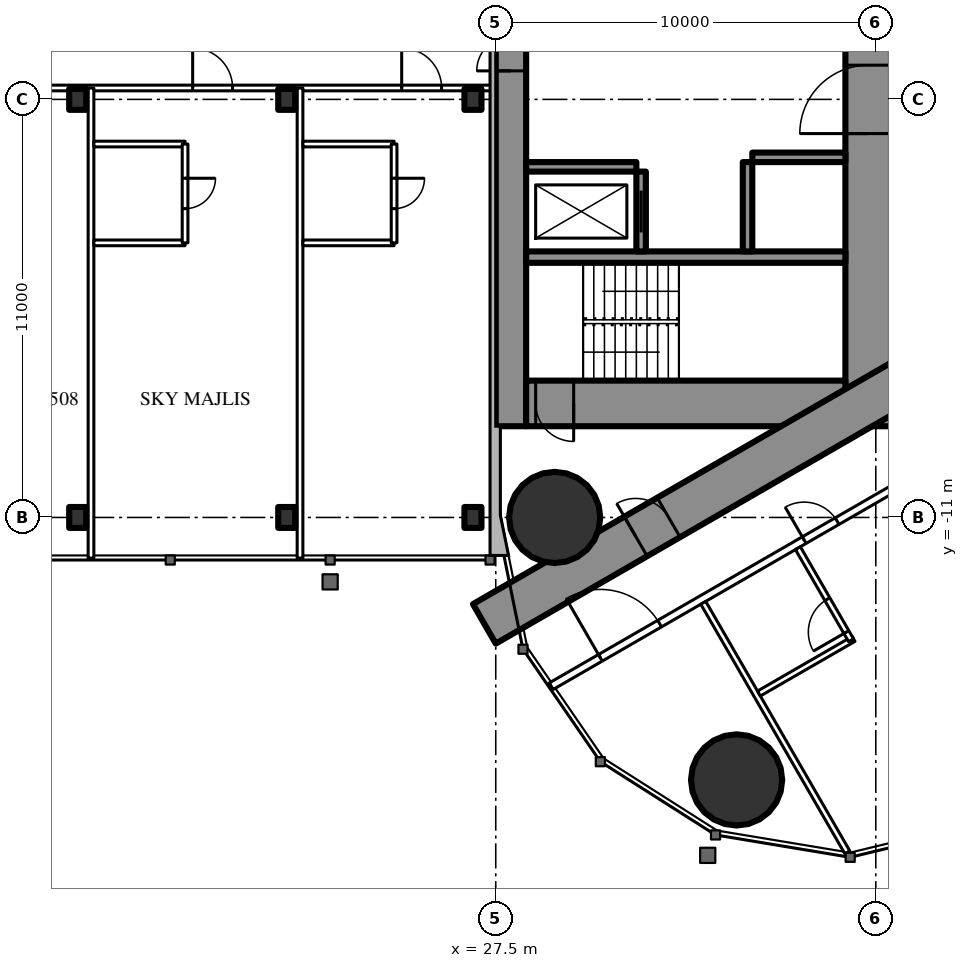
"""IFC4 building model, lengths in metres.
Left out: names, types, materials, properties, quantities, classifications, styles, units other than length and angle.
Written with IfcOpenShell. Run it as: python <this file> out.ifc"""

import sys

from ifc_helpers import new_model, si_unit, direction, frame, frame_2d, origin, origin_2d, place, context, subcontext, project, spatial, rectangle, circle, i_section, extrude, element, fill, save


model = new_model("IFC4")
c1 = context("Model", 3, precision=1e-05, world=origin(), true_north=direction((0.0, 1.0)))
c2 = subcontext(c1, "Body", "Model", "MODEL_VIEW")
j1 = project(units=[si_unit("LENGTHUNIT", "METRE"), si_unit("PLANEANGLEUNIT", "RADIAN")], contexts=[c1])
p1 = place(None, origin())
s1 = spatial("IfcSite", under=j1, at=p1, CompositionType="ELEMENT")
p2 = place(p1, origin())
s2 = spatial("IfcBuilding", under=s1, at=p2, CompositionType="ELEMENT")
p3 = place(p2, frame((0.0, 0.0, 244.1)))
s3 = spatial("IfcBuildingStorey", under=s2, at=p3, CompositionType="ELEMENT", Elevation=244.1)
for number, where, z_axis, x_axis in (
    (1, (33.837, -17.906, 0.0), (0.0, 0.0, 1.0), (1.0, 0.0, 0.0)),
    (2, (29.05, -11.0, 0.0), (0.0, 0.0, 1.0), (1.0, 0.0, 0.0)),
):
    element("IfcColumn", number, at=place(p3, frame(where, z_axis=z_axis, x_axis=x_axis)), inside=s3, PredefinedType="COLUMN", context=c2, shape_type="SweptSolid", body=[
        extrude(circle(Radius=1.2, at=origin_2d()), origin(), (0.0, 0.0, 1.0), 3.6),
    ])
p4 = place(p3, frame((27.9, -8.6, 0.0), z_axis=(0.0, 0.0, 1.0), x_axis=(0.0, 1.0, 0.0)))
e3 = element("IfcWall", 3, at=p4, inside=s3, PredefinedType="SHEAR", context=c2, shape_type="SweptSolid", body=[
    extrude(rectangle(XDim=17.2, YDim=0.8, at=frame_2d((8.6, 0.0))), origin(), (0.0, 0.0, 1.0), 3.6),
])
p5 = place(p4, frame((9.35, 0.0, 0.0)))
e4 = element("IfcOpeningElement", 4, at=p5, cuts=e3, PredefinedType="OPENING", context=c2, shape_type="SweptSolid", body=[
    extrude(rectangle(XDim=0.9, YDim=2.2, at=frame_2d((0.45, 1.1))), frame((0.0, 0.41, 0.0), z_axis=(0.0, -1.0, 0.0), x_axis=(1.0, 0.0, 0.0)), (0.0, 0.0, 1.0), 0.82),
])
p6 = place(p3, frame((37.3, -8.6, 0.0), z_axis=(0.0, 0.0, 1.0), x_axis=(0.0, 1.0, 0.0)))
e5 = element("IfcWall", 5, at=p6, inside=s3, PredefinedType="SHEAR", context=c2, shape_type="SweptSolid", body=[
    extrude(rectangle(XDim=17.2, YDim=1.2, at=frame_2d((8.6, 0.0))), origin(), (0.0, 0.0, 1.0), 3.6),
])
p7 = place(p6, frame((7.7, 0.0, 0.0)))
e6 = element("IfcOpeningElement", 6, at=p7, cuts=e5, PredefinedType="OPENING", context=c2, shape_type="SweptSolid", body=[
    extrude(rectangle(XDim=1.8, YDim=2.2, at=frame_2d((0.9, 1.1))), frame((0.0, 0.61, 0.0), z_axis=(0.0, -1.0, 0.0), x_axis=(1.0, 0.0, 0.0)), (0.0, 0.0, 1.0), 1.22),
])
p8 = place(p3, frame((28.3, -8.0, 0.0), z_axis=(0.0, 0.0, 1.0), x_axis=(1.0, 0.0, 0.0)))
e7 = element("IfcWall", 7, at=p8, inside=s3, PredefinedType="SHEAR", context=c2, shape_type="SweptSolid", body=[
    extrude(rectangle(XDim=8.4, YDim=1.2, at=frame_2d((4.2, 0.0))), origin(), (0.0, 0.0, 1.0), 3.6),
])
p9 = place(p8, frame((0.25, 0.0, 0.0)))
e8 = element("IfcOpeningElement", 8, at=p9, cuts=e7, PredefinedType="OPENING", context=c2, shape_type="SweptSolid", body=[
    extrude(rectangle(XDim=1.0, YDim=2.2, at=frame_2d((0.5, 1.1))), frame((0.0, 0.61, 0.0), z_axis=(0.0, -1.0, 0.0), x_axis=(1.0, 0.0, 0.0)), (0.0, 0.0, 1.0), 1.22),
])
p10 = place(p3, frame((28.3, -4.15, 0.0), z_axis=(0.0, 0.0, 1.0), x_axis=(1.0, 0.0, 0.0)))
e9 = element("IfcWall", 9, at=p10, inside=s3, PredefinedType="SHEAR", context=c2, shape_type="SweptSolid", body=[
    extrude(rectangle(XDim=8.4, YDim=0.3, at=frame_2d((4.2, 0.0))), origin(), (0.0, 0.0, 1.0), 3.6),
])
p11 = place(p3, frame((31.325, -4.0, 0.0), z_axis=(0.0, 0.0, 1.0), x_axis=(0.0, 1.0, 0.0)))
e10 = element("IfcWall", 10, at=p11, inside=s3, PredefinedType="SHEAR", context=c2, shape_type="SweptSolid", body=[
    extrude(rectangle(XDim=2.1, YDim=0.25, at=frame_2d((1.05, 0.0))), origin(), (0.0, 0.0, 1.0), 3.6),
])
p12 = place(p11, frame((0.5, 0.0, 0.0)))
e11 = element("IfcOpeningElement", 11, at=p12, cuts=e10, PredefinedType="OPENING", context=c2, shape_type="SweptSolid", body=[
    extrude(rectangle(XDim=1.1, YDim=2.2, at=frame_2d((0.55, 1.1))), frame((0.0, 0.135, 0.0), z_axis=(0.0, -1.0, 0.0), x_axis=(1.0, 0.0, 0.0)), (0.0, 0.0, 1.0), 0.27),
])
p13 = place(p3, frame((34.125, -4.0, 0.0), z_axis=(0.0, 0.0, 1.0), x_axis=(0.0, 1.0, 0.0)))
e12 = element("IfcWall", 12, at=p13, inside=s3, PredefinedType="SHEAR", context=c2, shape_type="SweptSolid", body=[
    extrude(rectangle(XDim=2.35, YDim=0.25, at=frame_2d((1.175, 0.0))), origin(), (0.0, 0.0, 1.0), 3.6),
])
p14 = place(p3, frame((28.3, -1.775, 0.0), z_axis=(0.0, 0.0, 1.0), x_axis=(1.0, 0.0, 0.0)))
e13 = element("IfcWall", 13, at=p14, inside=s3, PredefinedType="SHEAR", context=c2, shape_type="SweptSolid", body=[
    extrude(rectangle(XDim=2.9, YDim=0.25, at=frame_2d((1.45, 0.0))), origin(), (0.0, 0.0, 1.0), 3.6),
])
p15 = place(p3, frame((34.25, -1.525, 0.0), z_axis=(0.0, 0.0, 1.0), x_axis=(1.0, 0.0, 0.0)))
e14 = element("IfcWall", 14, at=p15, inside=s3, PredefinedType="SHEAR", context=c2, shape_type="SweptSolid", body=[
    extrude(rectangle(XDim=2.45, YDim=0.25, at=frame_2d((1.225, 0.0))), origin(), (0.0, 0.0, 1.0), 3.6),
])
p16 = place(p3, frame((27.2, -13.8, 0.0), z_axis=(0.0, 0.0, 1.0), x_axis=(0.866027159892, 0.499996958321, 0.0)))
e15 = element("IfcWall", 15, at=p16, inside=s3, PredefinedType="SHEAR", context=c2, shape_type="SweptSolid", body=[
    extrude(rectangle(XDim=27.947, YDim=1.2, at=frame_2d((13.973, 0.0))), origin(), (0.0, 0.0, 1.0), 3.6),
])
p17 = place(p16, frame((4.6, 0.0, 0.0)))
e16 = element("IfcOpeningElement", 16, at=p17, cuts=e15, PredefinedType="OPENING", context=c2, shape_type="SweptSolid", body=[
    extrude(rectangle(XDim=1.0, YDim=2.2, at=frame_2d((0.5, 1.1))), frame((0.0, 0.61, 0.0), z_axis=(0.0, -1.0, 0.0), x_axis=(1.0, 0.0, 0.0)), (0.0, 0.0, 1.0), 1.22),
])
p18 = place(p16, frame((13.395, 0.0, 0.0)))
e17 = element("IfcOpeningElement", 17, at=p18, cuts=e15, PredefinedType="OPENING", context=c2, shape_type="SweptSolid", body=[
    extrude(rectangle(XDim=1.8, YDim=2.2, at=frame_2d((0.9, 1.1))), frame((0.0, 0.61, 0.0), z_axis=(0.0, -1.0, 0.0), x_axis=(1.0, 0.0, 0.0)), (0.0, 0.0, 1.0), 1.22),
])
p19 = place(p3, frame((27.2, 13.8, 0.0), z_axis=(0.0, 0.0, 1.0), x_axis=(0.866024515034, -0.500001539357, 0.0)))
e18 = element("IfcWall", 18, at=p19, inside=s3, PredefinedType="SHEAR", context=c2, shape_type="SweptSolid", body=[
    extrude(rectangle(XDim=26.907, YDim=1.2, at=frame_2d((13.454, 0.0))), origin(), (0.0, 0.0, 1.0), 3.6),
])
p20 = place(p19, frame((4.6, 0.0, 0.0)))
e19 = element("IfcOpeningElement", 19, at=p20, cuts=e18, PredefinedType="OPENING", context=c2, shape_type="SweptSolid", body=[
    extrude(rectangle(XDim=1.0, YDim=2.2, at=frame_2d((0.5, 1.1))), frame((0.0, 0.61, 0.0), z_axis=(0.0, -1.0, 0.0), x_axis=(1.0, 0.0, 0.0)), (0.0, 0.0, 1.0), 1.22),
])
p21 = place(p19, frame((13.395, 0.0, 0.0)))
e20 = element("IfcOpeningElement", 20, at=p21, cuts=e18, PredefinedType="OPENING", context=c2, shape_type="SweptSolid", body=[
    extrude(rectangle(XDim=1.8, YDim=2.2, at=frame_2d((0.9, 1.1))), frame((0.0, 0.61, 0.0), z_axis=(0.0, -1.0, 0.0), x_axis=(1.0, 0.0, 0.0)), (0.0, 0.0, 1.0), 1.22),
])
for number, where, z_axis, x_axis in (
    (21, (16.5, -11.0, 0.0), (0.0, 0.0, 1.0), (1.0, 0.0, 0.0)),
    (22, (22.0, -11.0, 0.0), (0.0, 0.0, 1.0), (1.0, 0.0, 0.0)),
    (23, (26.9, -11.0, 0.0), (0.0, 0.0, 1.0), (1.0, 0.0, 0.0)),
    (24, (16.5, 0.0, 0.0), (0.0, 0.0, 1.0), (1.0, 0.0, 0.0)),
    (25, (22.0, 0.0, 0.0), (0.0, 0.0, 1.0), (1.0, 0.0, 0.0)),
    (26, (26.9, 0.0, 0.0), (0.0, 0.0, 1.0), (1.0, 0.0, 0.0)),
):
    element("IfcColumn", number, at=place(p3, frame(where, z_axis=z_axis, x_axis=x_axis)), inside=s3, PredefinedType="COLUMN", context=c2, shape_type="SweptSolid", body=[
        extrude(i_section(OverallWidth=0.448, OverallDepth=0.55, WebThickness=0.072, FlangeThickness=0.115, FilletRadius=0.02, at=origin_2d()), origin(), (0.0, 0.0, 1.0), 3.6),
    ])
p22 = place(p3, frame((28.959, -15.44, 0.0), z_axis=(0.0, 0.0, 1.0), x_axis=(0.866025227435, 0.500000305447, 0.0)))
e27 = element("IfcWall", 27, at=p22, inside=s3, PredefinedType="PARTITIONING", context=c2, shape_type="SweptSolid", body=[
    extrude(rectangle(XDim=30.88, YDim=0.2, at=frame_2d((15.44, 0.0))), origin(), (0.0, 0.0, 1.0), 3.35),
])
p23 = place(p22, frame((1.494, 0.0, 0.0)))
e28 = element("IfcOpeningElement", 28, at=p23, cuts=e27, PredefinedType="OPENING", context=c2, shape_type="SweptSolid", body=[
    extrude(rectangle(XDim=1.8, YDim=2.04, at=frame_2d((0.9, 1.02))), frame((0.0, 0.11, 0.0), z_axis=(0.0, -1.0, 0.0), x_axis=(1.0, 0.0, 0.0)), (0.0, 0.0, 1.0), 0.22),
])
p24 = place(p22, frame((7.687, 0.0, 0.0)))
e29 = element("IfcOpeningElement", 29, at=p24, cuts=e27, PredefinedType="OPENING", context=c2, shape_type="SweptSolid", body=[
    extrude(rectangle(XDim=1.0, YDim=2.2, at=frame_2d((0.5, 1.1))), frame((0.0, 0.11, 0.0), z_axis=(0.0, -1.0, 0.0), x_axis=(1.0, 0.0, 0.0)), (0.0, 0.0, 1.0), 0.22),
])
p25 = place(p22, frame((18.321, 0.0, 0.0)))
e30 = element("IfcOpeningElement", 30, at=p25, cuts=e27, PredefinedType="OPENING", context=c2, shape_type="SweptSolid", body=[
    extrude(rectangle(XDim=0.95, YDim=2.2, at=frame_2d((0.475, 1.1))), frame((0.0, 0.11, 0.0), z_axis=(0.0, -1.0, 0.0), x_axis=(1.0, 0.0, 0.0)), (0.0, 0.0, 1.0), 0.22),
])
p26 = place(p22, frame((22.203, 0.0, 0.0)))
e31 = element("IfcOpeningElement", 31, at=p26, cuts=e27, PredefinedType="OPENING", context=c2, shape_type="SweptSolid", body=[
    extrude(rectangle(XDim=0.95, YDim=2.2, at=frame_2d((0.475, 1.1))), frame((0.0, 0.11, 0.0), z_axis=(0.0, -1.0, 0.0), x_axis=(1.0, 0.0, 0.0)), (0.0, 0.0, 1.0), 0.22),
])
p27 = place(p22, frame((26.192, 0.0, 0.0)))
e32 = element("IfcOpeningElement", 32, at=p27, cuts=e27, PredefinedType="OPENING", context=c2, shape_type="SweptSolid", body=[
    extrude(rectangle(XDim=1.8, YDim=2.2, at=frame_2d((0.9, 1.1))), frame((0.0, 0.11, 0.0), z_axis=(0.0, -1.0, 0.0), x_axis=(1.0, 0.0, 0.0)), (0.0, 0.0, 1.0), 0.22),
])
p28 = place(p3, frame((32.96, -13.246, 0.0), z_axis=(0.0, 0.0, 1.0), x_axis=(0.500000236886, -0.866025267018, 0.0)))
e33 = element("IfcWall", 33, at=p28, inside=s3, PredefinedType="PARTITIONING", context=c2, shape_type="SweptSolid", body=[
    extrude(rectangle(XDim=7.583, YDim=0.15, at=frame_2d((3.791, 0.0))), origin(), (0.0, 0.0, 1.0), 3.35),
])
p29 = place(p3, frame((34.425, -15.633, 0.0), z_axis=(0.0, 0.0, 1.0), x_axis=(0.866018712932, 0.500011588718, 0.0)))
e34 = element("IfcWall", 34, at=p29, inside=s3, PredefinedType="PARTITIONING", context=c2, shape_type="SweptSolid", body=[
    extrude(rectangle(XDim=2.875, YDim=0.15, at=frame_2d((1.438, 0.0))), origin(), (0.0, 0.0, 1.0), 3.35),
])
p30 = place(p3, frame((35.45, -11.808, 0.0), z_axis=(0.0, 0.0, 1.0), x_axis=(0.49994636267, -0.866056369097, 0.0)))
e35 = element("IfcWall", 35, at=p30, inside=s3, PredefinedType="PARTITIONING", context=c2, shape_type="SweptSolid", body=[
    extrude(rectangle(XDim=2.8, YDim=0.15, at=frame_2d((1.4, 0.0))), origin(), (0.0, 0.0, 1.0), 3.35),
])
p31 = place(p30, frame((1.55, 0.0, 0.0)))
e36 = element("IfcOpeningElement", 36, at=p31, cuts=e35, PredefinedType="OPENING", context=c2, shape_type="SweptSolid", body=[
    extrude(rectangle(XDim=1.0, YDim=2.2, at=frame_2d((0.5, 1.1))), frame((0.0, 0.085, 0.0), z_axis=(0.0, -1.0, 0.0), x_axis=(1.0, 0.0, 0.0)), (0.0, 0.0, 1.0), 0.17),
])
p32 = place(p3, frame((-27.5, 0.3, 0.0), z_axis=(0.0, 0.0, 1.0), x_axis=(1.0, 0.0, 0.0)))
e37 = element("IfcWall", 37, at=p32, inside=s3, PredefinedType="PARTITIONING", context=c2, shape_type="SweptSolid", body=[
    extrude(rectangle(XDim=55.0, YDim=0.15, at=frame_2d((27.5, 0.0))), origin(), (0.0, 0.0, 1.0), 2.4),
])
p33 = place(p32, frame((1.575, 0.0, 0.0)))
e38 = element("IfcOpeningElement", 38, at=p33, cuts=e37, PredefinedType="OPENING", context=c2, shape_type="SweptSolid", body=[
    extrude(rectangle(XDim=1.0, YDim=2.2, at=frame_2d((0.5, 1.1))), frame((0.0, 0.085, 0.0), z_axis=(0.0, -1.0, 0.0), x_axis=(1.0, 0.0, 0.0)), (0.0, 0.0, 1.0), 0.17),
])
p34 = place(p32, frame((8.525, 0.0, 0.0)))
e39 = element("IfcOpeningElement", 39, at=p34, cuts=e37, PredefinedType="OPENING", context=c2, shape_type="SweptSolid", body=[
    extrude(rectangle(XDim=1.05, YDim=2.4, at=frame_2d((0.525, 1.2))), frame((0.0, 0.085, 0.0), z_axis=(0.0, -1.0, 0.0), x_axis=(1.0, 0.0, 0.0)), (0.0, 0.0, 1.0), 0.17),
])
p35 = place(p32, frame((14.025, 0.0, 0.0)))
e40 = element("IfcOpeningElement", 40, at=p35, cuts=e37, PredefinedType="OPENING", context=c2, shape_type="SweptSolid", body=[
    extrude(rectangle(XDim=1.05, YDim=2.4, at=frame_2d((0.525, 1.2))), frame((0.0, 0.085, 0.0), z_axis=(0.0, -1.0, 0.0), x_axis=(1.0, 0.0, 0.0)), (0.0, 0.0, 1.0), 0.17),
])
p36 = place(p32, frame((25.025, 0.0, 0.0)))
e41 = element("IfcOpeningElement", 41, at=p36, cuts=e37, PredefinedType="OPENING", context=c2, shape_type="SweptSolid", body=[
    extrude(rectangle(XDim=1.05, YDim=2.4, at=frame_2d((0.525, 1.2))), frame((0.0, 0.085, 0.0), z_axis=(0.0, -1.0, 0.0), x_axis=(1.0, 0.0, 0.0)), (0.0, 0.0, 1.0), 0.17),
])
p37 = place(p32, frame((30.525, 0.0, 0.0)))
e42 = element("IfcOpeningElement", 42, at=p37, cuts=e37, PredefinedType="OPENING", context=c2, shape_type="SweptSolid", body=[
    extrude(rectangle(XDim=1.05, YDim=2.4, at=frame_2d((0.525, 1.2))), frame((0.0, 0.085, 0.0), z_axis=(0.0, -1.0, 0.0), x_axis=(1.0, 0.0, 0.0)), (0.0, 0.0, 1.0), 0.17),
])
p38 = place(p32, frame((41.525, 0.0, 0.0)))
e43 = element("IfcOpeningElement", 43, at=p38, cuts=e37, PredefinedType="OPENING", context=c2, shape_type="SweptSolid", body=[
    extrude(rectangle(XDim=1.05, YDim=2.4, at=frame_2d((0.525, 1.2))), frame((0.0, 0.085, 0.0), z_axis=(0.0, -1.0, 0.0), x_axis=(1.0, 0.0, 0.0)), (0.0, 0.0, 1.0), 0.17),
])
p39 = place(p32, frame((47.025, 0.0, 0.0)))
e44 = element("IfcOpeningElement", 44, at=p39, cuts=e37, PredefinedType="OPENING", context=c2, shape_type="SweptSolid", body=[
    extrude(rectangle(XDim=1.05, YDim=2.4, at=frame_2d((0.525, 1.2))), frame((0.0, 0.085, 0.0), z_axis=(0.0, -1.0, 0.0), x_axis=(1.0, 0.0, 0.0)), (0.0, 0.0, 1.0), 0.17),
])
p40 = place(p32, frame((52.525, 0.0, 0.0)))
e45 = element("IfcOpeningElement", 45, at=p40, cuts=e37, PredefinedType="OPENING", context=c2, shape_type="SweptSolid", body=[
    extrude(rectangle(XDim=1.05, YDim=2.4, at=frame_2d((0.525, 1.2))), frame((0.0, 0.085, 0.0), z_axis=(0.0, -1.0, 0.0), x_axis=(1.0, 0.0, 0.0)), (0.0, 0.0, 1.0), 0.17),
])
for number, where, z_axis, x_axis in (
    (46, (16.85, -12.07, 0.0), (0.0, 0.0, 1.0), (0.0, 1.0, 0.0)),
    (47, (22.35, -12.07, 0.0), (0.0, 0.0, 1.0), (0.0, 1.0, 0.0)),
):
    element("IfcWall", number, at=place(p3, frame(where, z_axis=z_axis, x_axis=x_axis)), inside=s3, PredefinedType="PARTITIONING", context=c2, shape_type="SweptSolid", body=[
        extrude(rectangle(XDim=12.37, YDim=0.15, at=frame_2d((6.185, 0.0))), origin(), (0.0, 0.0, 1.0), 3.4),
    ])
for number, where, z_axis, x_axis in (
    (48, (16.925, -3.775, 0.0), (0.0, 0.0, 1.0), (1.0, 0.0, 0.0)),
    (49, (16.925, -1.175, 0.0), (0.0, 0.0, 1.0), (1.0, 0.0, 0.0)),
):
    element("IfcWall", number, at=place(p3, frame(where, z_axis=z_axis, x_axis=x_axis)), inside=s3, PredefinedType="PARTITIONING", context=c2, shape_type="SweptSolid", body=[
        extrude(rectangle(XDim=2.4, YDim=0.15, at=frame_2d((1.2, 0.0))), origin(), (0.0, 0.0, 1.0), 3.4),
    ])
p41 = place(p3, frame((19.325, -3.775, 0.0), z_axis=(0.0, 0.0, 1.0), x_axis=(0.0, 1.0, 0.0)))
e50 = element("IfcWall", 50, at=p41, inside=s3, PredefinedType="PARTITIONING", context=c2, shape_type="SweptSolid", body=[
    extrude(rectangle(XDim=2.6, YDim=0.15, at=frame_2d((1.3, 0.0))), origin(), (0.0, 0.0, 1.0), 3.4),
])
p42 = place(p41, frame((0.9, 0.0, 0.0)))
e51 = element("IfcOpeningElement", 51, at=p42, cuts=e50, PredefinedType="OPENING", context=c2, shape_type="SweptSolid", body=[
    extrude(rectangle(XDim=0.8, YDim=2.2, at=frame_2d((0.4, 1.1))), frame((0.0, 0.085, 0.0), z_axis=(0.0, -1.0, 0.0), x_axis=(1.0, 0.0, 0.0)), (0.0, 0.0, 1.0), 0.17),
])
for number, where, z_axis, x_axis in (
    (52, (22.425, -3.775, 0.0), (0.0, 0.0, 1.0), (1.0, 0.0, 0.0)),
    (53, (22.425, -1.175, 0.0), (0.0, 0.0, 1.0), (1.0, 0.0, 0.0)),
):
    element("IfcWall", number, at=place(p3, frame(where, z_axis=z_axis, x_axis=x_axis)), inside=s3, PredefinedType="PARTITIONING", context=c2, shape_type="SweptSolid", body=[
        extrude(rectangle(XDim=2.4, YDim=0.15, at=frame_2d((1.2, 0.0))), origin(), (0.0, 0.0, 1.0), 3.4),
    ])
p43 = place(p3, frame((24.825, -3.775, 0.0), z_axis=(0.0, 0.0, 1.0), x_axis=(0.0, 1.0, 0.0)))
e54 = element("IfcWall", 54, at=p43, inside=s3, PredefinedType="PARTITIONING", context=c2, shape_type="SweptSolid", body=[
    extrude(rectangle(XDim=2.6, YDim=0.15, at=frame_2d((1.3, 0.0))), origin(), (0.0, 0.0, 1.0), 3.4),
])
p44 = place(p43, frame((0.9, 0.0, 0.0)))
e55 = element("IfcOpeningElement", 55, at=p44, cuts=e54, PredefinedType="OPENING", context=c2, shape_type="SweptSolid", body=[
    extrude(rectangle(XDim=0.8, YDim=2.2, at=frame_2d((0.4, 1.1))), frame((0.0, 0.085, 0.0), z_axis=(0.0, -1.0, 0.0), x_axis=(1.0, 0.0, 0.0)), (0.0, 0.0, 1.0), 0.17),
])
p45 = place(p23, origin())
e56 = element("IfcDoor", 56, at=p45, inside=s3, OperationType="DOUBLE_DOOR_SINGLE_SWING", PredefinedType="DOOR", context=c2, shape_type="SweptSolid", body=[
    extrude(rectangle(XDim=1.8, YDim=2.04, at=frame_2d((0.9, 1.02))), frame((0.0, 0.025, 0.0), z_axis=(0.0, -1.0, 0.0), x_axis=(1.0, 0.0, 0.0)), (0.0, 0.0, 1.0), 0.05),
])
fill(e28, e56)
p46 = place(p31, origin())
e57 = element("IfcDoor", 57, at=p46, inside=s3, OperationType="SINGLE_SWING_RIGHT", PredefinedType="DOOR", context=c2, shape_type="SweptSolid", body=[
    extrude(rectangle(XDim=1.0, YDim=2.2, at=frame_2d((0.5, 1.1))), frame((0.0, 0.025, 0.0), z_axis=(0.0, -1.0, 0.0), x_axis=(1.0, 0.0, 0.0)), (0.0, 0.0, 1.0), 0.05),
])
fill(e36, e57)
p47 = place(p24, origin())
e58 = element("IfcDoor", 58, at=p47, inside=s3, OperationType="SINGLE_SWING_LEFT", PredefinedType="DOOR", context=c2, shape_type="SweptSolid", body=[
    extrude(rectangle(XDim=1.0, YDim=2.2, at=frame_2d((0.5, 1.1))), frame((0.0, 0.025, 0.0), z_axis=(0.0, -1.0, 0.0), x_axis=(1.0, 0.0, 0.0)), (0.0, 0.0, 1.0), 0.05),
])
fill(e29, e58)
p48 = place(p17, origin())
e59 = element("IfcDoor", 59, at=p48, inside=s3, OperationType="SINGLE_SWING_LEFT", PredefinedType="DOOR", context=c2, shape_type="SweptSolid", body=[
    extrude(rectangle(XDim=1.0, YDim=2.2, at=frame_2d((0.5, 1.1))), frame((0.0, 0.025, 0.0), z_axis=(0.0, -1.0, 0.0), x_axis=(1.0, 0.0, 0.0)), (0.0, 0.0, 1.0), 0.05),
])
fill(e16, e59)
p49 = place(p7, origin())
e60 = element("IfcDoor", 60, at=p49, inside=s3, OperationType="DOUBLE_DOOR_SINGLE_SWING", PredefinedType="DOOR", context=c2, shape_type="SweptSolid", body=[
    extrude(rectangle(XDim=1.8, YDim=2.2, at=frame_2d((0.9, 1.1))), frame((0.0, 0.025, 0.0), z_axis=(0.0, -1.0, 0.0), x_axis=(1.0, 0.0, 0.0)), (0.0, 0.0, 1.0), 0.05),
])
fill(e6, e60)
p50 = place(p9, origin())
e61 = element("IfcDoor", 61, at=p50, inside=s3, OperationType="SINGLE_SWING_RIGHT", PredefinedType="DOOR", context=c2, shape_type="SweptSolid", body=[
    extrude(rectangle(XDim=1.0, YDim=2.2, at=frame_2d((0.5, 1.1))), frame((0.0, 0.025, 0.0), z_axis=(0.0, -1.0, 0.0), x_axis=(1.0, 0.0, 0.0)), (0.0, 0.0, 1.0), 0.05),
])
fill(e8, e61)
p51 = place(p5, origin())
e62 = element("IfcDoor", 62, at=p51, inside=s3, OperationType="SINGLE_SWING_LEFT", PredefinedType="DOOR", context=c2, shape_type="SweptSolid", body=[
    extrude(rectangle(XDim=0.9, YDim=2.2, at=frame_2d((0.45, 1.1))), frame((0.0, 0.025, 0.0), z_axis=(0.0, -1.0, 0.0), x_axis=(1.0, 0.0, 0.0)), (0.0, 0.0, 1.0), 0.05),
])
fill(e4, e62)
p52 = place(p42, origin())
e63 = element("IfcDoor", 63, at=p52, inside=s3, OperationType="SINGLE_SWING_RIGHT", PredefinedType="DOOR", context=c2, shape_type="SweptSolid", body=[
    extrude(rectangle(XDim=0.8, YDim=2.2, at=frame_2d((0.4, 1.1))), frame((0.0, 0.025, 0.0), z_axis=(0.0, -1.0, 0.0), x_axis=(1.0, 0.0, 0.0)), (0.0, 0.0, 1.0), 0.05),
])
fill(e51, e63)
p53 = place(p39, origin())
e64 = element("IfcDoor", 64, at=p53, inside=s3, OperationType="SINGLE_SWING_LEFT", PredefinedType="DOOR", context=c2, shape_type="SweptSolid", body=[
    extrude(rectangle(XDim=1.05, YDim=2.4, at=frame_2d((0.525, 1.2))), frame((0.0, 0.025, 0.0), z_axis=(0.0, -1.0, 0.0), x_axis=(1.0, 0.0, 0.0)), (0.0, 0.0, 1.0), 0.05),
])
fill(e44, e64)
p54 = place(p44, origin())
e65 = element("IfcDoor", 65, at=p54, inside=s3, OperationType="SINGLE_SWING_RIGHT", PredefinedType="DOOR", context=c2, shape_type="SweptSolid", body=[
    extrude(rectangle(XDim=0.8, YDim=2.2, at=frame_2d((0.4, 1.1))), frame((0.0, 0.025, 0.0), z_axis=(0.0, -1.0, 0.0), x_axis=(1.0, 0.0, 0.0)), (0.0, 0.0, 1.0), 0.05),
])
fill(e55, e65)
p55 = place(p40, origin())
e66 = element("IfcDoor", 66, at=p55, inside=s3, OperationType="SINGLE_SWING_LEFT", PredefinedType="DOOR", context=c2, shape_type="SweptSolid", body=[
    extrude(rectangle(XDim=1.05, YDim=2.4, at=frame_2d((0.525, 1.2))), frame((0.0, 0.025, 0.0), z_axis=(0.0, -1.0, 0.0), x_axis=(1.0, 0.0, 0.0)), (0.0, 0.0, 1.0), 0.05),
])
fill(e45, e66)
p56 = place(p12, origin())
e67 = element("IfcDoor", 67, at=p56, inside=s3, OperationType="SLIDING_TO_LEFT", PredefinedType="USERDEFINED", context=c2, shape_type="SweptSolid", body=[
    extrude(rectangle(XDim=1.1, YDim=2.2, at=frame_2d((0.55, 1.1))), frame((0.0, 0.025, 0.0), z_axis=(0.0, -1.0, 0.0), x_axis=(1.0, 0.0, 0.0)), (0.0, 0.0, 1.0), 0.05),
])
fill(e11, e67)
save(model, sys.argv[1])
